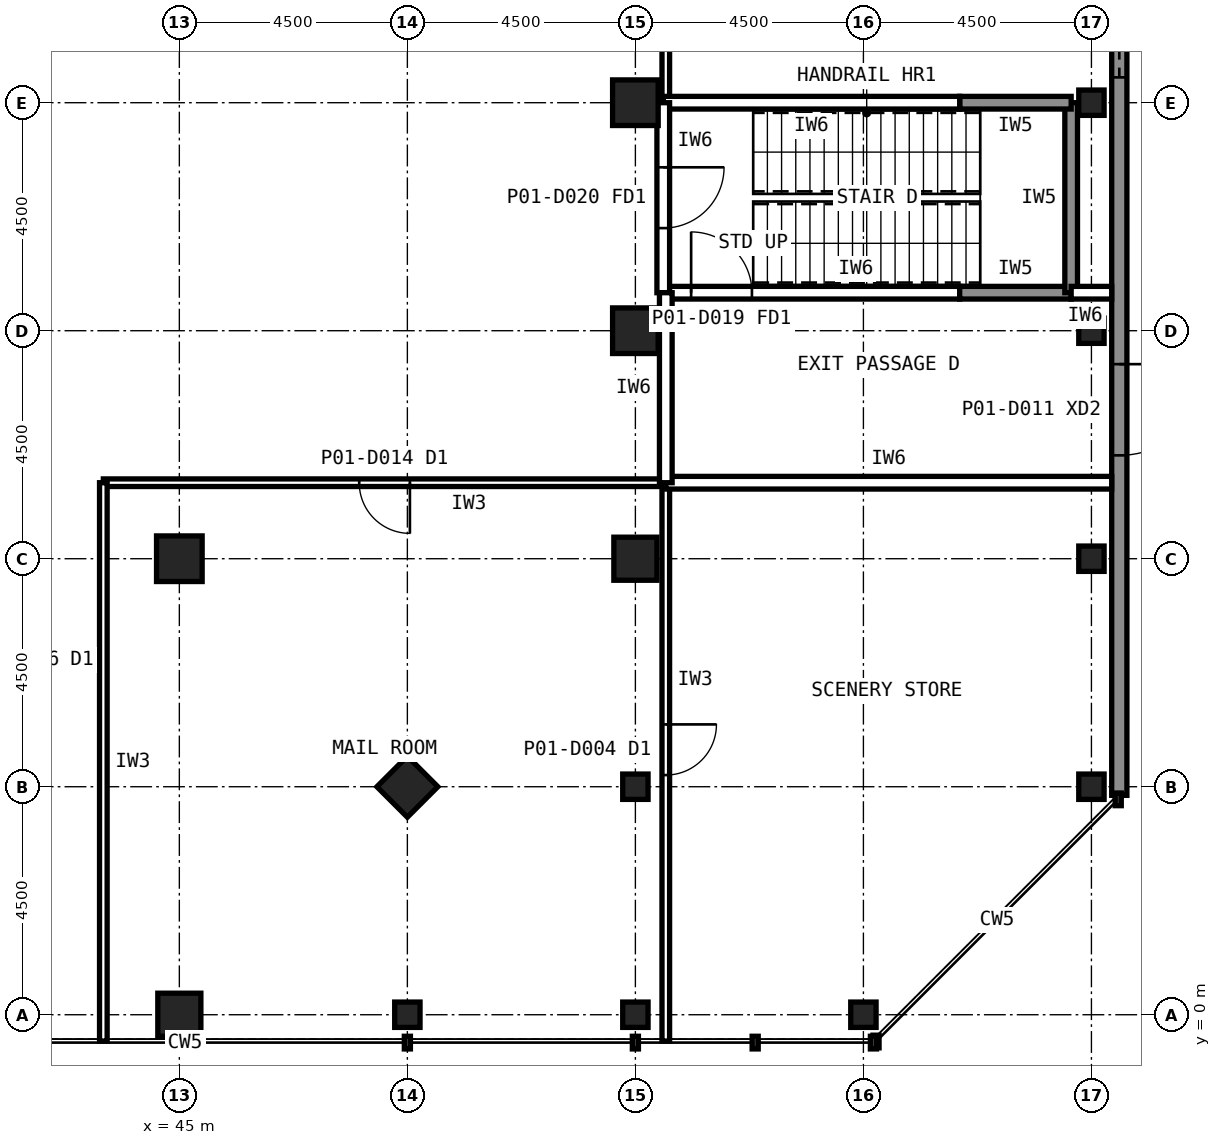
"""IFC4 building model, lengths in metres.
Left out: names, types, materials, properties, quantities, classifications, styles, units other than length and angle.
Written with IfcOpenShell. Run it as: python <this file> out.ifc"""

import sys

from ifc_helpers import new_model, si_unit, direction, frame, frame_2d, origin, origin_2d, place, context, subcontext, project, spatial, rectangle, hollow_rectangle, extrude, element, fill, save


model = new_model("IFC4")
c1 = context("Model", 3, precision=1e-05, world=origin(), true_north=direction((0.0, 1.0)))
c2 = subcontext(c1, "Body", "Model", "MODEL_VIEW")
j1 = project(units=[si_unit("LENGTHUNIT", "METRE"), si_unit("PLANEANGLEUNIT", "RADIAN")], contexts=[c1])
p1 = place(None, origin())
s1 = spatial("IfcSite", under=j1, at=p1, CompositionType="ELEMENT")
p2 = place(p1, origin())
s2 = spatial("IfcBuilding", under=s1, at=p2, CompositionType="ELEMENT")
p3 = place(p2, origin())
s3 = spatial("IfcBuildingStorey", under=s2, at=p3, CompositionType="ELEMENT", Elevation=0.0)
for number, where, z_axis, x_axis in (
    (1, (45.0, 0.0, -0.25), (0.0, 0.0, 1.0), (1.0, 0.0, 0.0)),
    (2, (54.0, 9.0, -0.25), (0.0, 0.0, 1.0), (1.0, 0.0, 0.0)),
):
    element("IfcColumn", number, at=place(p3, frame(where, z_axis=z_axis, x_axis=x_axis)), inside=s3, PredefinedType="COLUMN", context=c2, shape_type="SweptSolid", body=[
        extrude(hollow_rectangle(XDim=0.85, YDim=0.85, WallThickness=0.05, at=origin_2d()), origin(), (0.0, 0.0, 1.0), 6.25),
    ])
for number, where, z_axis, x_axis in (
    (3, (54.0, 13.5, -0.25), (0.0, 0.0, 1.0), (1.0, 0.0, 0.0)),
    (4, (54.0, 18.0, -0.25), (0.0, 0.0, 1.0), (1.0, 0.0, 0.0)),
):
    element("IfcColumn", number, at=place(p3, frame(where, z_axis=z_axis, x_axis=x_axis)), inside=s3, PredefinedType="COLUMN", context=c2, shape_type="SweptSolid", body=[
        extrude(hollow_rectangle(XDim=0.9, YDim=0.9, WallThickness=0.063, at=origin_2d()), origin(), (0.0, 0.0, 1.0), 6.25),
    ])
p4 = place(p3, frame((49.5, 4.5, -0.25), z_axis=(0.0, 0.0, 1.0), x_axis=(0.707106781187, 0.707106781187, 0.0)))
e5 = element("IfcColumn", 5, at=p4, inside=s3, PredefinedType="COLUMN", context=c2, shape_type="SweptSolid", body=[
    extrude(hollow_rectangle(XDim=0.85, YDim=0.85, WallThickness=0.05, at=origin_2d()), origin(), (0.0, 0.0, 1.0), 6.25),
])
p5 = place(p3, frame((45.0, 9.0, -0.25), z_axis=(0.0, 0.0, 1.0), x_axis=(1.0, 0.0, 0.0)))
e6 = element("IfcColumn", 6, at=p5, inside=s3, PredefinedType="COLUMN", context=c2, shape_type="SweptSolid", body=[
    extrude(hollow_rectangle(XDim=0.9, YDim=0.9, WallThickness=0.063, at=origin_2d()), origin(), (0.0, 0.0, 1.0), 6.25),
])
for number, where, z_axis, x_axis in (
    (7, (63.0, 4.5, -0.25), (0.0, 0.0, 1.0), (1.0, 0.0, 0.0)),
    (8, (63.0, 9.0, -0.25), (0.0, 0.0, 1.0), (1.0, 0.0, 0.0)),
    (9, (63.0, 13.5, -0.25), (0.0, 0.0, 1.0), (1.0, 0.0, 0.0)),
    (10, (63.0, 18.0, -0.25), (0.0, 0.0, 1.0), (1.0, 0.0, 0.0)),
    (11, (58.5, 0.0, -0.25), (0.0, 0.0, 1.0), (1.0, 0.0, 0.0)),
    (12, (54.0, 0.0, -0.25), (0.0, 0.0, 1.0), (1.0, 0.0, 0.0)),
    (13, (49.5, 0.0, -0.25), (0.0, 0.0, 1.0), (1.0, 0.0, 0.0)),
    (14, (54.0, 4.5, -0.25), (0.0, 0.0, 1.0), (1.0, 0.0, 0.0)),
):
    element("IfcColumn", number, at=place(p3, frame(where, z_axis=z_axis, x_axis=x_axis)), inside=s3, PredefinedType="COLUMN", context=c2, shape_type="SweptSolid", body=[
        extrude(hollow_rectangle(XDim=0.5, YDim=0.5, WallThickness=0.022, at=origin_2d()), origin(), (0.0, 0.0, 1.0), 6.25),
    ])
p6 = place(p3, frame((63.55, 49.67, 0.0), z_axis=(0.0, 0.0, 1.0), x_axis=(0.0, -1.0, 0.0)))
e15 = element("IfcWall", 15, at=p6, inside=s3, PredefinedType="SOLIDWALL", context=c2, shape_type="SweptSolid", body=[
    extrude(rectangle(XDim=45.34, YDim=0.3, at=frame_2d((22.67, 0.0))), origin(), (0.0, 0.0, 1.0), 6.0),
])
p7 = place(p6, frame((27.67, 0.0, 0.0)))
e16 = element("IfcOpeningElement", 16, at=p7, cuts=e15, PredefinedType="OPENING", context=c2, shape_type="SweptSolid", body=[
    extrude(rectangle(XDim=3.5, YDim=4.5, at=frame_2d((1.75, 2.25))), frame((0.0, 0.16, 0.0), z_axis=(0.0, -1.0, 0.0), x_axis=(1.0, 0.0, 0.0)), (0.0, 0.0, 1.0), 0.32),
])
p8 = place(p6, frame((18.67, 0.0, 0.0)))
e17 = element("IfcOpeningElement", 17, at=p8, cuts=e15, PredefinedType="OPENING", context=c2, shape_type="SweptSolid", body=[
    extrude(rectangle(XDim=3.5, YDim=4.5, at=frame_2d((1.75, 2.25))), frame((0.0, 0.16, 0.0), z_axis=(0.0, -1.0, 0.0), x_axis=(1.0, 0.0, 0.0)), (0.0, 0.0, 1.0), 0.32),
])
p9 = place(p6, frame((23.17, 0.0, 0.0)))
e18 = element("IfcOpeningElement", 18, at=p9, cuts=e15, PredefinedType="OPENING", context=c2, shape_type="SweptSolid", body=[
    extrude(rectangle(XDim=1.0, YDim=2.1, at=frame_2d((0.5, 1.05))), frame((0.0, 0.16, 0.0), z_axis=(0.0, -1.0, 0.0), x_axis=(1.0, 0.0, 0.0)), (0.0, 0.0, 1.0), 0.32),
])
p10 = place(p6, frame((36.83, 0.0, 0.0)))
e19 = element("IfcOpeningElement", 19, at=p10, cuts=e15, PredefinedType="OPENING", context=c2, shape_type="SweptSolid", body=[
    extrude(rectangle(XDim=1.8, YDim=2.1, at=frame_2d((0.9, 1.05))), frame((0.0, 0.16, 0.0), z_axis=(0.0, -1.0, 0.0), x_axis=(1.0, 0.0, 0.0)), (0.0, 0.0, 1.0), 0.32),
])
p11 = place(p6, frame((6.71, 0.0, 0.0)))
e20 = element("IfcOpeningElement", 20, at=p11, cuts=e15, PredefinedType="OPENING", context=c2, shape_type="SweptSolid", body=[
    extrude(rectangle(XDim=1.8, YDim=2.1, at=frame_2d((0.9, 1.05))), frame((0.0, 0.16, 0.0), z_axis=(0.0, -1.0, 0.0), x_axis=(1.0, 0.0, 0.0)), (0.0, 0.0, 1.0), 0.32),
])
p12 = place(p3, frame((54.6, 10.45, 0.0), z_axis=(0.0, 0.0, 1.0), x_axis=(0.0, -1.0, 0.0)))
e21 = element("IfcWall", 21, at=p12, inside=s3, PredefinedType="PARTITIONING", context=c2, shape_type="SweptSolid", body=[
    extrude(rectangle(XDim=10.97, YDim=0.15, at=frame_2d((5.485, 0.0))), origin(), (0.0, 0.0, 1.0), 5.8),
])
p13 = place(p12, frame((4.72, 0.0, 0.0)))
e22 = element("IfcOpeningElement", 22, at=p13, cuts=e21, PredefinedType="OPENING", context=c2, shape_type="SweptSolid", body=[
    extrude(rectangle(XDim=1.0, YDim=2.1, at=frame_2d((0.5, 1.05))), frame((0.0, 0.085, 0.0), z_axis=(0.0, -1.0, 0.0), x_axis=(1.0, 0.0, 0.0)), (0.0, 0.0, 1.0), 0.17),
])
p14 = place(p3, frame((54.6, 35.95, 0.0), z_axis=(0.0, 0.0, 1.0), x_axis=(0.0, -1.0, 0.0)))
e23 = element("IfcWall", 23, at=p14, inside=s3, PredefinedType="PARTITIONING", context=c2, shape_type="SweptSolid", body=[
    extrude(rectangle(XDim=17.9, YDim=0.15, at=frame_2d((8.95, 0.0))), origin(), (0.0, 0.0, 1.0), 5.8),
])
p15 = place(p14, frame((9.6, 0.0, 0.0)))
e24 = element("IfcOpeningElement", 24, at=p15, cuts=e23, PredefinedType="OPENING", context=c2, shape_type="SweptSolid", body=[
    extrude(rectangle(XDim=1.8, YDim=2.4, at=frame_2d((0.9, 1.2))), frame((0.0, 0.085, 0.0), z_axis=(0.0, -1.0, 0.0), x_axis=(1.0, 0.0, 0.0)), (0.0, 0.0, 1.0), 0.17),
])
p16 = place(p3, frame((54.6, 10.5, 0.0), z_axis=(0.0, 0.0, 1.0), x_axis=(-1.0, 0.0, 0.0)))
e25 = element("IfcWall", 25, at=p16, inside=s3, PredefinedType="PARTITIONING", context=c2, shape_type="SweptSolid", body=[
    extrude(rectangle(XDim=11.1, YDim=0.15, at=frame_2d((5.55, 0.0))), origin(), (0.0, 0.0, 1.0), 5.8),
])
p17 = place(p16, frame((5.05, 0.0, 0.0)))
e26 = element("IfcOpeningElement", 26, at=p17, cuts=e25, PredefinedType="OPENING", context=c2, shape_type="SweptSolid", body=[
    extrude(rectangle(XDim=1.0, YDim=2.1, at=frame_2d((0.5, 1.05))), frame((0.0, 0.085, 0.0), z_axis=(0.0, -1.0, 0.0), x_axis=(1.0, 0.0, 0.0)), (0.0, 0.0, 1.0), 0.17),
])
p18 = place(p3, frame((43.5, 10.5, 0.0), z_axis=(0.0, 0.0, 1.0), x_axis=(0.0, -1.0, 0.0)))
e27 = element("IfcWall", 27, at=p18, inside=s3, PredefinedType="PARTITIONING", context=c2, shape_type="SweptSolid", body=[
    extrude(rectangle(XDim=11.02, YDim=0.15, at=frame_2d((5.51, 0.0))), origin(), (0.0, 0.0, 1.0), 5.8),
])
p19 = place(p3, frame((54.55, 14.25, -0.25), z_axis=(0.0, 0.0, 1.0), x_axis=(1.0, 0.0, 0.0)))
e28 = element("IfcWall", 28, at=p19, inside=s3, PredefinedType="PARTITIONING", context=c2, shape_type="SweptSolid", body=[
    extrude(rectangle(XDim=5.85, YDim=0.25, at=frame_2d((2.925, 0.0))), origin(), (0.0, 0.0, 1.0), 6.05),
])
p20 = place(p19, frame((0.55, 0.0, 0.25)))
e29 = element("IfcOpeningElement", 29, at=p20, cuts=e28, PredefinedType="OPENING", context=c2, shape_type="SweptSolid", body=[
    extrude(rectangle(XDim=1.2, YDim=2.1, at=frame_2d((0.6, 1.05))), frame((0.0, 0.135, 0.0), z_axis=(0.0, -1.0, 0.0), x_axis=(1.0, 0.0, 0.0)), (0.0, 0.0, 1.0), 0.27),
])
p21 = place(p3, frame((60.4, 14.25, -0.25), z_axis=(0.0, 0.0, 1.0), x_axis=(1.0, 0.0, 0.0)))
e30 = element("IfcWall", 30, at=p21, inside=s3, PredefinedType="SOLIDWALL", context=c2, shape_type="SweptSolid", body=[
    extrude(rectangle(XDim=2.2, YDim=0.25, at=frame_2d((1.1, 0.0))), origin(), (0.0, 0.0, 1.0), 6.25),
])
p22 = place(p3, frame((62.6, 14.25, -0.25), z_axis=(0.0, 0.0, 1.0), x_axis=(0.0, 1.0, 0.0)))
e31 = element("IfcWall", 31, at=p22, inside=s3, PredefinedType="SOLIDWALL", context=c2, shape_type="SweptSolid", body=[
    extrude(rectangle(XDim=3.75, YDim=0.25, at=frame_2d((1.875, 0.0))), origin(), (0.0, 0.0, 1.0), 6.25),
])
p23 = place(p3, frame((62.6, 18.0, -0.25), z_axis=(0.0, 0.0, 1.0), x_axis=(-1.0, 0.0, 0.0)))
e32 = element("IfcWall", 32, at=p23, inside=s3, PredefinedType="SOLIDWALL", context=c2, shape_type="SweptSolid", body=[
    extrude(rectangle(XDim=2.2, YDim=0.25, at=frame_2d((1.1, 0.0))), origin(), (0.0, 0.0, 1.0), 5.439),
])
p24 = place(p3, frame((60.4, 18.0, -0.25), z_axis=(0.0, 0.0, 1.0), x_axis=(-1.0, 0.0, 0.0)))
e33 = element("IfcWall", 33, at=p24, inside=s3, PredefinedType="PARTITIONING", context=c2, shape_type="SweptSolid", body=[
    extrude(rectangle(XDim=5.85, YDim=0.25, at=frame_2d((2.925, 0.0))), origin(), (0.0, 0.0, 1.0), 5.439),
])
p25 = place(p3, frame((54.55, 18.0, -0.25), z_axis=(0.0, 0.0, 1.0), x_axis=(0.0, -1.0, 0.0)))
e34 = element("IfcWall", 34, at=p25, inside=s3, PredefinedType="PARTITIONING", context=c2, shape_type="SweptSolid", body=[
    extrude(rectangle(XDim=3.75, YDim=0.25, at=frame_2d((1.875, 0.0))), origin(), (0.0, 0.0, 1.0), 6.05),
])
p26 = place(p25, frame((1.275, 0.0, 0.25)))
e35 = element("IfcOpeningElement", 35, at=p26, cuts=e34, PredefinedType="OPENING", context=c2, shape_type="SweptSolid", body=[
    extrude(rectangle(XDim=1.2, YDim=2.1, at=frame_2d((0.6, 1.05))), frame((0.0, 0.135, 0.0), z_axis=(0.0, -1.0, 0.0), x_axis=(1.0, 0.0, 0.0)), (0.0, 0.0, 1.0), 0.27),
])
p27 = place(p3, frame((54.6, 10.5, 0.0), z_axis=(0.0, 0.0, 1.0), x_axis=(1.0, 0.0, 0.0)))
e36 = element("IfcWall", 36, at=p27, inside=s3, PredefinedType="PARTITIONING", context=c2, shape_type="SweptSolid", body=[
    extrude(rectangle(XDim=8.8, YDim=0.25, at=frame_2d((4.4, 0.0))), origin(), (0.0, 0.0, 1.0), 5.8),
])
p28 = place(p3, frame((54.6, 10.5, 0.0), z_axis=(0.0, 0.0, 1.0), x_axis=(0.0, 1.0, 0.0)))
e37 = element("IfcWall", 37, at=p28, inside=s3, PredefinedType="PARTITIONING", context=c2, shape_type="SweptSolid", body=[
    extrude(rectangle(XDim=3.75, YDim=0.25, at=frame_2d((1.875, 0.0))), origin(), (0.0, 0.0, 1.0), 5.8),
])
p29 = place(p3, frame((62.6, 14.25, 0.0), z_axis=(0.0, 0.0, 1.0), x_axis=(1.0, 0.0, 0.0)))
e38 = element("IfcWall", 38, at=p29, inside=s3, PredefinedType="PARTITIONING", context=c2, shape_type="SweptSolid", body=[
    extrude(rectangle(XDim=0.8, YDim=0.25, at=frame_2d((0.4, 0.0))), origin(), (0.0, 0.0, 1.0), 5.8),
])
p30 = place(p7, origin())
e39 = element("IfcDoor", 39, at=p30, inside=s3, OperationType="SINGLE_SWING_LEFT", PredefinedType="DOOR", context=c2, shape_type="SweptSolid", body=[
    extrude(rectangle(XDim=3.5, YDim=4.5, at=frame_2d((1.75, 2.25))), frame((0.0, 0.025, 0.0), z_axis=(0.0, -1.0, 0.0), x_axis=(1.0, 0.0, 0.0)), (0.0, 0.0, 1.0), 0.05),
])
fill(e16, e39)
p31 = place(p10, origin())
e40 = element("IfcDoor", 40, at=p31, inside=s3, OperationType="SINGLE_SWING_LEFT", PredefinedType="DOOR", context=c2, shape_type="SweptSolid", body=[
    extrude(rectangle(XDim=1.8, YDim=2.1, at=frame_2d((0.9, 1.05))), frame((0.0, 0.025, 0.0), z_axis=(0.0, -1.0, 0.0), x_axis=(1.0, 0.0, 0.0)), (0.0, 0.0, 1.0), 0.05),
])
fill(e19, e40)
p32 = place(p13, origin())
e41 = element("IfcDoor", 41, at=p32, inside=s3, OperationType="SINGLE_SWING_LEFT", PredefinedType="DOOR", context=c2, shape_type="SweptSolid", body=[
    extrude(rectangle(XDim=1.0, YDim=2.1, at=frame_2d((0.5, 1.05))), frame((0.0, 0.025, 0.0), z_axis=(0.0, -1.0, 0.0), x_axis=(1.0, 0.0, 0.0)), (0.0, 0.0, 1.0), 0.05),
])
fill(e22, e41)
p33 = place(p17, origin())
e42 = element("IfcDoor", 42, at=p33, inside=s3, OperationType="SINGLE_SWING_LEFT", PredefinedType="DOOR", context=c2, shape_type="SweptSolid", body=[
    extrude(rectangle(XDim=1.0, YDim=2.1, at=frame_2d((0.5, 1.05))), frame((0.0, 0.025, 0.0), z_axis=(0.0, -1.0, 0.0), x_axis=(1.0, 0.0, 0.0)), (0.0, 0.0, 1.0), 0.05),
])
fill(e26, e42)
p34 = place(p26, origin())
e43 = element("IfcDoor", 43, at=p34, inside=s3, OperationType="SINGLE_SWING_LEFT", PredefinedType="DOOR", context=c2, shape_type="SweptSolid", body=[
    extrude(rectangle(XDim=1.2, YDim=2.1, at=frame_2d((0.6, 1.05))), frame((0.0, 0.025, 0.0), z_axis=(0.0, -1.0, 0.0), x_axis=(1.0, 0.0, 0.0)), (0.0, 0.0, 1.0), 0.05),
])
fill(e35, e43)
p35 = place(p20, origin())
e44 = element("IfcDoor", 44, at=p35, inside=s3, OperationType="SINGLE_SWING_LEFT", PredefinedType="DOOR", context=c2, shape_type="SweptSolid", body=[
    extrude(rectangle(XDim=1.2, YDim=2.1, at=frame_2d((0.6, 1.05))), frame((0.0, 0.025, 0.0), z_axis=(0.0, -1.0, 0.0), x_axis=(1.0, 0.0, 0.0)), (0.0, 0.0, 1.0), 0.05),
])
fill(e29, e44)
save(model, sys.argv[1])
